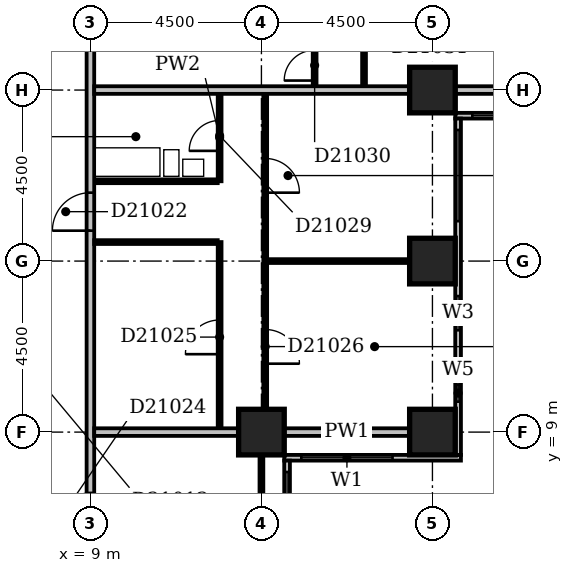
"""IFC4 building model, lengths in metres.
Left out: names, types, materials, properties, quantities, classifications, styles, units other than length and angle.
Written with IfcOpenShell. Run it as: python <this file> out.ifc"""

import sys

from ifc_helpers import new_model, si_unit, direction, frame, frame_2d, origin, origin_2d, place, context, subcontext, project, spatial, rectangle, extrude, element, fill, save


model = new_model("IFC4")
c1 = context("Model", 3, precision=1e-05, world=origin(), true_north=direction((0.0, 1.0)))
c2 = subcontext(c1, "Body", "Model", "MODEL_VIEW")
j1 = project(units=[si_unit("LENGTHUNIT", "METRE"), si_unit("PLANEANGLEUNIT", "RADIAN")], contexts=[c1])
p1 = place(None, origin())
s1 = spatial("IfcSite", under=j1, at=p1, CompositionType="ELEMENT")
p2 = place(p1, origin())
s2 = spatial("IfcBuilding", under=s1, at=p2, CompositionType="ELEMENT")
p3 = place(p2, frame((0.0, 0.0, 86.6)))
s3 = spatial("IfcBuildingStorey", under=s2, at=p3, CompositionType="ELEMENT", Elevation=86.6)
for number, where, z_axis, x_axis in (
    (1, (13.5, 9.0, -0.3), (0.0, 0.0, 1.0), (1.0, 0.0, 0.0)),
    (2, (18.0, 9.0, -0.3), (0.0, 0.0, 1.0), (1.0, 0.0, 0.0)),
    (3, (18.0, 13.5, -0.3), (0.0, 0.0, 1.0), (1.0, 0.0, 0.0)),
    (4, (18.0, 18.0, -0.3), (0.0, 0.0, 1.0), (1.0, 0.0, 0.0)),
):
    element("IfcColumn", number, at=place(p3, frame(where, z_axis=z_axis, x_axis=x_axis)), inside=s3, PredefinedType="COLUMN", context=c2, shape_type="SweptSolid", body=[
        extrude(rectangle(XDim=1.2, YDim=1.2, at=origin_2d()), origin(), (0.0, 0.0, 1.0), 3.6),
    ])
p4 = place(p3, frame((14.175, 3.9, 0.0), z_axis=(0.0, 0.0, 1.0), x_axis=(0.0, 1.0, 0.0)))
e5 = element("IfcWall", 5, at=p4, inside=s3, PredefinedType="STANDARD", context=c2, shape_type="SweptSolid", body=[
    extrude(rectangle(XDim=4.35, YDim=0.15, at=frame_2d((2.175, 0.0))), origin(), (0.0, 0.0, 1.0), 2.7),
])
p5 = place(p4, frame((1.65, 0.0, 0.6)))
e6 = element("IfcOpeningElement", 6, at=p5, cuts=e5, PredefinedType="OPENING", context=c2, shape_type="SweptSolid", body=[
    extrude(rectangle(XDim=2.4, YDim=1.8, at=frame_2d((1.2, 0.9))), frame((0.0, 0.087, 0.0), z_axis=(0.0, -1.0, 0.0), x_axis=(1.0, 0.0, 0.0)), (0.0, 0.0, 1.0), 0.174),
])
p6 = place(p3, frame((14.1, 8.325, 0.0), z_axis=(0.0, 0.0, 1.0), x_axis=(1.0, 0.0, 0.0)))
e7 = element("IfcWall", 7, at=p6, inside=s3, PredefinedType="STANDARD", context=c2, shape_type="SweptSolid", body=[
    extrude(rectangle(XDim=4.65, YDim=0.15, at=frame_2d((2.325, 0.0))), origin(), (0.0, 0.0, 1.0), 2.7),
])
p7 = place(p6, frame((0.45, 0.0, 0.6)))
e8 = element("IfcOpeningElement", 8, at=p7, cuts=e7, PredefinedType="OPENING", context=c2, shape_type="SweptSolid", body=[
    extrude(rectangle(XDim=2.4, YDim=1.8, at=frame_2d((1.2, 0.9))), frame((0.0, 0.087, 0.0), z_axis=(0.0, -1.0, 0.0), x_axis=(1.0, 0.0, 0.0)), (0.0, 0.0, 1.0), 0.174),
])
p8 = place(p3, frame((18.675, 8.4, 0.0), z_axis=(0.0, 0.0, 1.0), x_axis=(0.0, 1.0, 0.0)))
e9 = element("IfcWall", 9, at=p8, inside=s3, PredefinedType="STANDARD", context=c2, shape_type="SweptSolid", body=[
    extrude(rectangle(XDim=8.85, YDim=0.15, at=frame_2d((4.425, 0.0))), origin(), (0.0, 0.0, 1.0), 2.7),
])
p9 = place(p8, frame((1.401, 0.0, 0.6)))
e10 = element("IfcOpeningElement", 10, at=p9, cuts=e9, PredefinedType="OPENING", context=c2, shape_type="SweptSolid", body=[
    extrude(rectangle(XDim=0.45, YDim=1.8, at=frame_2d((0.225, 0.9))), frame((0.0, 0.087, 0.0), z_axis=(0.0, -1.0, 0.0), x_axis=(1.0, 0.0, 0.0)), (0.0, 0.0, 1.0), 0.174),
])
p10 = place(p8, frame((3.28, 0.0, 0.6)))
e11 = element("IfcOpeningElement", 11, at=p10, cuts=e9, PredefinedType="OPENING", context=c2, shape_type="SweptSolid", body=[
    extrude(rectangle(XDim=0.9, YDim=1.8, at=frame_2d((0.45, 0.9))), frame((0.0, 0.087, 0.0), z_axis=(0.0, -1.0, 0.0), x_axis=(1.0, 0.0, 0.0)), (0.0, 0.0, 1.0), 0.174),
])
p11 = place(p8, frame((6.15, 0.0, 0.6)))
e12 = element("IfcOpeningElement", 12, at=p11, cuts=e9, PredefinedType="OPENING", context=c2, shape_type="SweptSolid", body=[
    extrude(rectangle(XDim=2.4, YDim=1.8, at=frame_2d((1.2, 0.9))), frame((0.0, 0.087, 0.0), z_axis=(0.0, -1.0, 0.0), x_axis=(1.0, 0.0, 0.0)), (0.0, 0.0, 1.0), 0.174),
])
p12 = place(p3, frame((18.6, 17.325, 0.0), z_axis=(0.0, 0.0, 1.0), x_axis=(1.0, 0.0, 0.0)))
e13 = element("IfcWall", 13, at=p12, inside=s3, PredefinedType="STANDARD", context=c2, shape_type="SweptSolid", body=[
    extrude(rectangle(XDim=4.65, YDim=0.15, at=frame_2d((2.325, 0.0))), origin(), (0.0, 0.0, 1.0), 2.7),
])
p13 = place(p12, frame((0.45, 0.0, 0.6)))
e14 = element("IfcOpeningElement", 14, at=p13, cuts=e13, PredefinedType="OPENING", context=c2, shape_type="SweptSolid", body=[
    extrude(rectangle(XDim=2.4, YDim=1.8, at=frame_2d((1.2, 0.9))), frame((0.0, 0.087, 0.0), z_axis=(0.0, -1.0, 0.0), x_axis=(1.0, 0.0, 0.0)), (0.0, 0.0, 1.0), 0.174),
])
p14 = place(p3, frame((9.0, 5.0, 0.0), z_axis=(0.0, 0.0, 1.0), x_axis=(0.0, 1.0, 0.0)))
e15 = element("IfcWall", 15, at=p14, inside=s3, PredefinedType="PARTITIONING", context=c2, shape_type="SweptSolid", body=[
    extrude(rectangle(XDim=44.5, YDim=0.2, at=frame_2d((22.25, 0.0))), origin(), (0.0, 0.0, 1.0), 3.3),
])
p15 = place(p14, frame((28.45, 0.0, 0.0)))
e16 = element("IfcOpeningElement", 16, at=p15, cuts=e15, PredefinedType="OPENING", context=c2, shape_type="SweptSolid", body=[
    extrude(rectangle(XDim=1.0, YDim=2.1, at=frame_2d((0.5, 1.05))), frame((0.0, 0.112, 0.0), z_axis=(0.0, -1.0, 0.0), x_axis=(1.0, 0.0, 0.0)), (0.0, 0.0, 1.0), 0.224),
])
p16 = place(p14, frame((22.8, 0.0, 0.0)))
e17 = element("IfcOpeningElement", 17, at=p16, cuts=e15, PredefinedType="OPENING", context=c2, shape_type="SweptSolid", body=[
    extrude(rectangle(XDim=1.0, YDim=2.1, at=frame_2d((0.5, 1.05))), frame((0.0, 0.112, 0.0), z_axis=(0.0, -1.0, 0.0), x_axis=(1.0, 0.0, 0.0)), (0.0, 0.0, 1.0), 0.224),
])
p17 = place(p14, frame((14.55, 0.0, 0.0)))
e18 = element("IfcOpeningElement", 18, at=p17, cuts=e15, PredefinedType="OPENING", context=c2, shape_type="SweptSolid", body=[
    extrude(rectangle(XDim=1.0, YDim=2.1, at=frame_2d((0.5, 1.05))), frame((0.0, 0.112, 0.0), z_axis=(0.0, -1.0, 0.0), x_axis=(1.0, 0.0, 0.0)), (0.0, 0.0, 1.0), 0.224),
])
p18 = place(p14, frame((9.3, 0.0, 0.0)))
e19 = element("IfcOpeningElement", 19, at=p18, cuts=e15, PredefinedType="OPENING", context=c2, shape_type="SweptSolid", body=[
    extrude(rectangle(XDim=1.0, YDim=2.1, at=frame_2d((0.5, 1.05))), frame((0.0, 0.112, 0.0), z_axis=(0.0, -1.0, 0.0), x_axis=(1.0, 0.0, 0.0)), (0.0, 0.0, 1.0), 0.224),
])
p19 = place(p14, frame((35.0, 0.0, 0.0)))
e20 = element("IfcOpeningElement", 20, at=p19, cuts=e15, PredefinedType="OPENING", context=c2, shape_type="SweptSolid", body=[
    extrude(rectangle(XDim=0.9, YDim=2.1, at=frame_2d((0.45, 1.05))), frame((0.0, 0.112, 0.0), z_axis=(0.0, -1.0, 0.0), x_axis=(1.0, 0.0, 0.0)), (0.0, 0.0, 1.0), 0.224),
])
p20 = place(p14, frame((1.5, 0.0, 0.0)))
e21 = element("IfcOpeningElement", 21, at=p20, cuts=e15, PredefinedType="OPENING", context=c2, shape_type="SweptSolid", body=[
    extrude(rectangle(XDim=0.9, YDim=2.1, at=frame_2d((0.45, 1.05))), frame((0.0, 0.112, 0.0), z_axis=(0.0, -1.0, 0.0), x_axis=(1.0, 0.0, 0.0)), (0.0, 0.0, 1.0), 0.224),
])
p21 = place(p3, frame((13.5, 5.1, 0.0), z_axis=(0.0, 0.0, 1.0), x_axis=(0.0, 1.0, 0.0)))
e22 = element("IfcWall", 22, at=p21, inside=s3, PredefinedType="PARTITIONING", context=c2, shape_type="SweptSolid", body=[
    extrude(rectangle(XDim=3.3, YDim=0.1, at=frame_2d((1.65, 0.0))), origin(), (0.0, 0.0, 1.0), 2.7),
])
p22 = place(p3, frame((9.1, 9.0, 0.0), z_axis=(0.0, 0.0, 1.0), x_axis=(1.0, 0.0, 0.0)))
e23 = element("IfcWall", 23, at=p22, inside=s3, PredefinedType="PARTITIONING", context=c2, shape_type="SweptSolid", body=[
    extrude(rectangle(XDim=3.8, YDim=0.2, at=frame_2d((1.9, 0.0))), origin(), (0.0, 0.0, 1.0), 3.3),
])
p23 = place(p3, frame((14.1, 9.0, 0.0), z_axis=(0.0, 0.0, 1.0), x_axis=(1.0, 0.0, 0.0)))
e24 = element("IfcWall", 24, at=p23, inside=s3, PredefinedType="PARTITIONING", context=c2, shape_type="SweptSolid", body=[
    extrude(rectangle(XDim=3.3, YDim=0.2, at=frame_2d((1.65, 0.0))), origin(), (0.0, 0.0, 1.0), 2.7),
])
p24 = place(p3, frame((12.4, 9.1, 0.0), z_axis=(0.0, 0.0, 1.0), x_axis=(0.0, 1.0, 0.0)))
e25 = element("IfcWall", 25, at=p24, inside=s3, PredefinedType="PARTITIONING", context=c2, shape_type="SweptSolid", body=[
    extrude(rectangle(XDim=4.9, YDim=0.1, at=frame_2d((2.45, 0.0))), origin(), (0.0, 0.0, 1.0), 3.3),
])
p25 = place(p24, frame((1.95, 0.0, 0.0)))
e26 = element("IfcOpeningElement", 26, at=p25, cuts=e25, PredefinedType="OPENING", context=c2, shape_type="SweptSolid", body=[
    extrude(rectangle(XDim=0.9, YDim=2.1, at=frame_2d((0.45, 1.05))), frame((0.0, 0.062, 0.0), z_axis=(0.0, -1.0, 0.0), x_axis=(1.0, 0.0, 0.0)), (0.0, 0.0, 1.0), 0.124),
])
p26 = place(p3, frame((13.6, 9.6, 0.0), z_axis=(0.0, 0.0, 1.0), x_axis=(0.0, 1.0, 0.0)))
e27 = element("IfcWall", 27, at=p26, inside=s3, PredefinedType="PARTITIONING", context=c2, shape_type="SweptSolid", body=[
    extrude(rectangle(XDim=8.3, YDim=0.1, at=frame_2d((4.15, 0.0))), origin(), (0.0, 0.0, 1.0), 3.3),
])
p27 = place(p26, frame((1.2, 0.0, 0.0)))
e28 = element("IfcOpeningElement", 28, at=p27, cuts=e27, PredefinedType="OPENING", context=c2, shape_type="SweptSolid", body=[
    extrude(rectangle(XDim=0.9, YDim=2.1, at=frame_2d((0.45, 1.05))), frame((0.0, 0.062, 0.0), z_axis=(0.0, -1.0, 0.0), x_axis=(1.0, 0.0, 0.0)), (0.0, 0.0, 1.0), 0.124),
])
p28 = place(p26, frame((5.7, 0.0, 0.0)))
e29 = element("IfcOpeningElement", 29, at=p28, cuts=e27, PredefinedType="OPENING", context=c2, shape_type="SweptSolid", body=[
    extrude(rectangle(XDim=0.9, YDim=2.1, at=frame_2d((0.45, 1.05))), frame((0.0, 0.062, 0.0), z_axis=(0.0, -1.0, 0.0), x_axis=(1.0, 0.0, 0.0)), (0.0, 0.0, 1.0), 0.124),
])
p29 = place(p3, frame((13.65, 13.5, 0.0), z_axis=(0.0, 0.0, 1.0), x_axis=(1.0, 0.0, 0.0)))
e30 = element("IfcWall", 30, at=p29, inside=s3, PredefinedType="PARTITIONING", context=c2, shape_type="SweptSolid", body=[
    extrude(rectangle(XDim=3.75, YDim=0.1, at=frame_2d((1.875, 0.0))), origin(), (0.0, 0.0, 1.0), 3.3),
])
p30 = place(p3, frame((9.1, 14.0, 0.0), z_axis=(0.0, 0.0, 1.0), x_axis=(1.0, 0.0, 0.0)))
e31 = element("IfcWall", 31, at=p30, inside=s3, PredefinedType="PARTITIONING", context=c2, shape_type="SweptSolid", body=[
    extrude(rectangle(XDim=3.25, YDim=0.1, at=frame_2d((1.625, 0.0))), origin(), (0.0, 0.0, 1.0), 3.3),
])
p31 = place(p3, frame((9.1, 15.6, 0.0), z_axis=(0.0, 0.0, 1.0), x_axis=(1.0, 0.0, 0.0)))
e32 = element("IfcWall", 32, at=p31, inside=s3, PredefinedType="PLUMBINGWALL", context=c2, shape_type="SweptSolid", body=[
    extrude(rectangle(XDim=3.25, YDim=0.1, at=frame_2d((1.625, 0.0))), origin(), (0.0, 0.0, 1.0), 3.3),
])
p32 = place(p3, frame((12.4, 15.6, 0.0), z_axis=(0.0, 0.0, 1.0), x_axis=(0.0, 1.0, 0.0)))
e33 = element("IfcWall", 33, at=p32, inside=s3, PredefinedType="PARTITIONING", context=c2, shape_type="SweptSolid", body=[
    extrude(rectangle(XDim=2.3, YDim=0.1, at=frame_2d((1.15, 0.0))), origin(), (0.0, 0.0, 1.0), 3.3),
])
p33 = place(p32, frame((0.8, 0.0, 0.0)))
e34 = element("IfcOpeningElement", 34, at=p33, cuts=e33, PredefinedType="OPENING", context=c2, shape_type="SweptSolid", body=[
    extrude(rectangle(XDim=0.8, YDim=2.1, at=frame_2d((0.4, 1.05))), frame((0.0, 0.062, 0.0), z_axis=(0.0, -1.0, 0.0), x_axis=(1.0, 0.0, 0.0)), (0.0, 0.0, 1.0), 0.124),
])
p34 = place(p3, frame((9.1, 18.0, 0.0), z_axis=(0.0, 0.0, 1.0), x_axis=(1.0, 0.0, 0.0)))
e35 = element("IfcWall", 35, at=p34, inside=s3, PredefinedType="PARTITIONING", context=c2, shape_type="SweptSolid", body=[
    extrude(rectangle(XDim=8.3, YDim=0.2, at=frame_2d((4.15, 0.0))), origin(), (0.0, 0.0, 1.0), 2.6),
])
p35 = place(p3, frame((18.6, 18.0, 0.0), z_axis=(0.0, 0.0, 1.0), x_axis=(1.0, 0.0, 0.0)))
e36 = element("IfcWall", 36, at=p35, inside=s3, PredefinedType="PARTITIONING", context=c2, shape_type="SweptSolid", body=[
    extrude(rectangle(XDim=3.3, YDim=0.2, at=frame_2d((1.65, 0.0))), origin(), (0.0, 0.0, 1.0), 2.7),
])
p36 = place(p3, frame((14.9, 18.1, 0.0), z_axis=(0.0, 0.0, 1.0), x_axis=(0.0, 1.0, 0.0)))
e37 = element("IfcWall", 37, at=p36, inside=s3, PredefinedType="PARTITIONING", context=c2, shape_type="SweptSolid", body=[
    extrude(rectangle(XDim=1.2, YDim=0.1, at=frame_2d((0.6, 0.0))), origin(), (0.0, 0.0, 1.0), 3.3),
])
p37 = place(p36, frame((0.15, 0.0, 0.0)))
e38 = element("IfcOpeningElement", 38, at=p37, cuts=e37, PredefinedType="OPENING", context=c2, shape_type="SweptSolid", body=[
    extrude(rectangle(XDim=0.8, YDim=2.1, at=frame_2d((0.4, 1.05))), frame((0.0, 0.062, 0.0), z_axis=(0.0, -1.0, 0.0), x_axis=(1.0, 0.0, 0.0)), (0.0, 0.0, 1.0), 0.124),
])
p38 = place(p3, frame((16.2, 18.1, 0.0), z_axis=(0.0, 0.0, 1.0), x_axis=(0.0, 1.0, 0.0)))
e39 = element("IfcWall", 39, at=p38, inside=s3, PredefinedType="PARTITIONING", context=c2, shape_type="SweptSolid", body=[
    extrude(rectangle(XDim=4.3, YDim=0.1, at=frame_2d((2.15, 0.0))), origin(), (0.0, 0.0, 1.0), 3.3),
])
p39 = place(p38, frame((1.7, 0.0, 0.0)))
e40 = element("IfcOpeningElement", 40, at=p39, cuts=e39, PredefinedType="OPENING", context=c2, shape_type="SweptSolid", body=[
    extrude(rectangle(XDim=0.9, YDim=2.1, at=frame_2d((0.45, 1.05))), frame((0.0, 0.062, 0.0), z_axis=(0.0, -1.0, 0.0), x_axis=(1.0, 0.0, 0.0)), (0.0, 0.0, 1.0), 0.124),
])
p40 = place(p5, origin())
e41 = element("IfcWindow", 41, at=p40, inside=s3, PartitioningType="SINGLE_PANEL", PredefinedType="WINDOW", context=c2, shape_type="SweptSolid", body=[
    extrude(rectangle(XDim=2.4, YDim=1.8, at=frame_2d((1.2, 0.9))), frame((0.0, 0.03, 0.0), z_axis=(0.0, -1.0, 0.0), x_axis=(1.0, 0.0, 0.0)), (0.0, 0.0, 1.0), 0.06),
])
fill(e6, e41)
p41 = place(p7, origin())
e42 = element("IfcWindow", 42, at=p41, inside=s3, PartitioningType="SINGLE_PANEL", PredefinedType="WINDOW", context=c2, shape_type="SweptSolid", body=[
    extrude(rectangle(XDim=2.4, YDim=1.8, at=frame_2d((1.2, 0.9))), frame((0.0, 0.03, 0.0), z_axis=(0.0, -1.0, 0.0), x_axis=(1.0, 0.0, 0.0)), (0.0, 0.0, 1.0), 0.06),
])
fill(e8, e42)
p42 = place(p9, origin())
e43 = element("IfcWindow", 43, at=p42, inside=s3, PartitioningType="SINGLE_PANEL", PredefinedType="WINDOW", context=c2, shape_type="SweptSolid", body=[
    extrude(rectangle(XDim=0.45, YDim=1.8, at=frame_2d((0.225, 0.9))), frame((0.0, 0.03, 0.0), z_axis=(0.0, -1.0, 0.0), x_axis=(1.0, 0.0, 0.0)), (0.0, 0.0, 1.0), 0.06),
])
fill(e10, e43)
p43 = place(p10, origin())
e44 = element("IfcWindow", 44, at=p43, inside=s3, PartitioningType="SINGLE_PANEL", PredefinedType="WINDOW", context=c2, shape_type="SweptSolid", body=[
    extrude(rectangle(XDim=0.9, YDim=1.8, at=frame_2d((0.45, 0.9))), frame((0.0, 0.03, 0.0), z_axis=(0.0, -1.0, 0.0), x_axis=(1.0, 0.0, 0.0)), (0.0, 0.0, 1.0), 0.06),
])
fill(e11, e44)
p44 = place(p11, origin())
e45 = element("IfcWindow", 45, at=p44, inside=s3, PartitioningType="SINGLE_PANEL", PredefinedType="WINDOW", context=c2, shape_type="SweptSolid", body=[
    extrude(rectangle(XDim=2.4, YDim=1.8, at=frame_2d((1.2, 0.9))), frame((0.0, 0.03, 0.0), z_axis=(0.0, -1.0, 0.0), x_axis=(1.0, 0.0, 0.0)), (0.0, 0.0, 1.0), 0.06),
])
fill(e12, e45)
p45 = place(p13, origin())
e46 = element("IfcWindow", 46, at=p45, inside=s3, PartitioningType="SINGLE_PANEL", PredefinedType="WINDOW", context=c2, shape_type="SweptSolid", body=[
    extrude(rectangle(XDim=2.4, YDim=1.8, at=frame_2d((1.2, 0.9))), frame((0.0, 0.03, 0.0), z_axis=(0.0, -1.0, 0.0), x_axis=(1.0, 0.0, 0.0)), (0.0, 0.0, 1.0), 0.06),
])
fill(e14, e46)
p46 = place(p18, origin())
e47 = element("IfcDoor", 47, at=p46, inside=s3, OperationType="SINGLE_SWING_LEFT", PredefinedType="DOOR", context=c2, shape_type="SweptSolid", body=[
    extrude(rectangle(XDim=1.0, YDim=2.1, at=frame_2d((0.5, 1.05))), frame((0.0, 0.025, 0.0), z_axis=(0.0, -1.0, 0.0), x_axis=(1.0, 0.0, 0.0)), (0.0, 0.0, 1.0), 0.05),
])
fill(e19, e47)
p47 = place(p25, origin())
e48 = element("IfcDoor", 48, at=p47, inside=s3, OperationType="SINGLE_SWING_LEFT", PredefinedType="DOOR", context=c2, shape_type="SweptSolid", body=[
    extrude(rectangle(XDim=0.9, YDim=2.1, at=frame_2d((0.45, 1.05))), frame((0.0, 0.025, 0.0), z_axis=(0.0, -1.0, 0.0), x_axis=(1.0, 0.0, 0.0)), (0.0, 0.0, 1.0), 0.05),
])
fill(e26, e48)
p48 = place(p27, frame((0.9, 0.0, 0.0), z_axis=(0.0, 0.0, 1.0), x_axis=(-1.0, 0.0, 0.0)))
e49 = element("IfcDoor", 49, at=p48, inside=s3, OperationType="SINGLE_SWING_RIGHT", PredefinedType="DOOR", context=c2, shape_type="SweptSolid", body=[
    extrude(rectangle(XDim=0.9, YDim=2.1, at=frame_2d((0.45, 1.05))), frame((0.0, 0.025, 0.0), z_axis=(0.0, -1.0, 0.0), x_axis=(1.0, 0.0, 0.0)), (0.0, 0.0, 1.0), 0.05),
])
fill(e28, e49)
p49 = place(p28, frame((0.9, 0.0, 0.0), z_axis=(0.0, 0.0, 1.0), x_axis=(-1.0, 0.0, 0.0)))
e50 = element("IfcDoor", 50, at=p49, inside=s3, OperationType="SINGLE_SWING_RIGHT", PredefinedType="DOOR", context=c2, shape_type="SweptSolid", body=[
    extrude(rectangle(XDim=0.9, YDim=2.1, at=frame_2d((0.45, 1.05))), frame((0.0, 0.025, 0.0), z_axis=(0.0, -1.0, 0.0), x_axis=(1.0, 0.0, 0.0)), (0.0, 0.0, 1.0), 0.05),
])
fill(e29, e50)
p50 = place(p33, origin())
e51 = element("IfcDoor", 51, at=p50, inside=s3, OperationType="SINGLE_SWING_LEFT", PredefinedType="DOOR", context=c2, shape_type="SweptSolid", body=[
    extrude(rectangle(XDim=0.8, YDim=2.1, at=frame_2d((0.4, 1.05))), frame((0.0, 0.025, 0.0), z_axis=(0.0, -1.0, 0.0), x_axis=(1.0, 0.0, 0.0)), (0.0, 0.0, 1.0), 0.05),
])
fill(e34, e51)
p51 = place(p37, origin())
e52 = element("IfcDoor", 52, at=p51, inside=s3, OperationType="SINGLE_SWING_LEFT", PredefinedType="DOOR", context=c2, shape_type="SweptSolid", body=[
    extrude(rectangle(XDim=0.8, YDim=2.1, at=frame_2d((0.4, 1.05))), frame((0.0, 0.025, 0.0), z_axis=(0.0, -1.0, 0.0), x_axis=(1.0, 0.0, 0.0)), (0.0, 0.0, 1.0), 0.05),
])
fill(e38, e52)
save(model, sys.argv[1])
